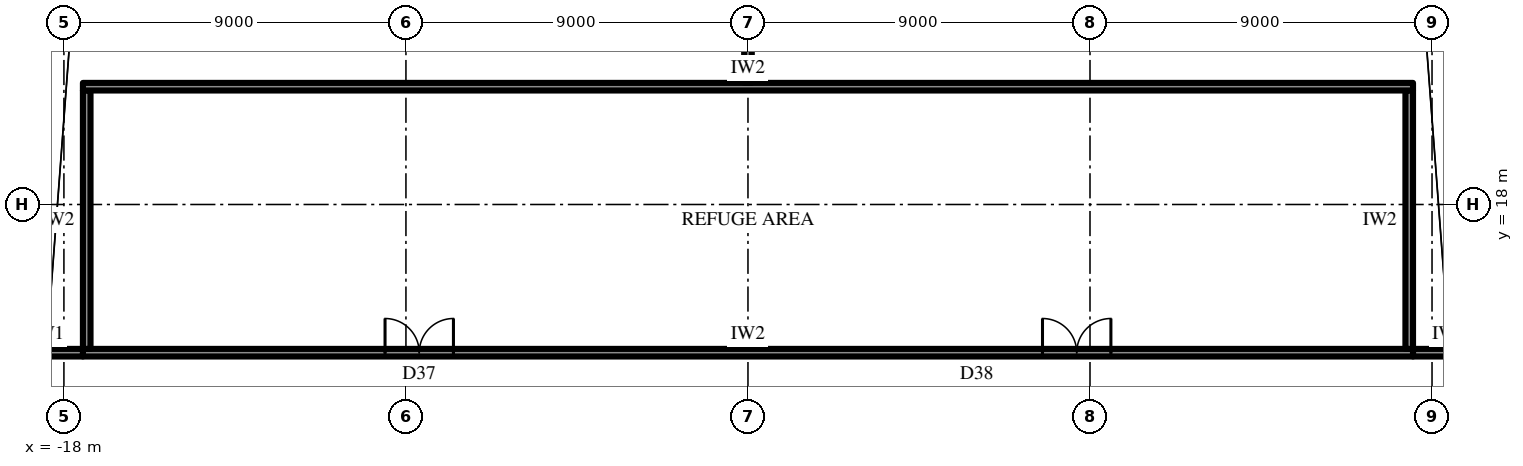
"""IFC4 building model, lengths in metres.
Left out: names, types, materials, properties, quantities, classifications, styles, units other than length and angle.
Written with IfcOpenShell. Run it as: python <this file> out.ifc"""

import sys

from ifc_helpers import new_model, si_unit, direction, frame, frame_2d, origin, place, context, subcontext, project, spatial, rectangle, extrude, element, fill, save


model = new_model("IFC4")
c1 = context("Model", 3, precision=1e-05, world=origin(), true_north=direction((0.0, 1.0)))
c2 = subcontext(c1, "Body", "Model", "MODEL_VIEW")
j1 = project(units=[si_unit("LENGTHUNIT", "METRE"), si_unit("PLANEANGLEUNIT", "RADIAN")], contexts=[c1])
p1 = place(None, origin())
s1 = spatial("IfcSite", under=j1, at=p1, CompositionType="ELEMENT")
p2 = place(p1, origin())
s2 = spatial("IfcBuilding", under=s1, at=p2, CompositionType="ELEMENT")
p3 = place(p2, frame((0.0, 0.0, 203.5)))
s3 = spatial("IfcBuildingStorey", under=s2, at=p3, CompositionType="ELEMENT", Elevation=203.5)
p4 = place(p3, frame((-17.5, 14.1, 0.0), z_axis=(0.0, 0.0, 1.0), x_axis=(1.0, 0.0, 0.0)))
e1 = element("IfcWall", 1, at=p4, inside=s3, PredefinedType="PARTITIONING", context=c2, shape_type="SweptSolid", body=[
    extrude(rectangle(XDim=35.0, YDim=0.2, at=frame_2d((17.5, 0.0))), origin(), (0.0, 0.0, 1.0), 6.7),
])
p5 = place(p4, frame((7.95, 0.0, 0.0)))
e2 = element("IfcOpeningElement", 2, at=p5, cuts=e1, PredefinedType="OPENING", context=c2, shape_type="SweptSolid", body=[
    extrude(rectangle(XDim=1.8, YDim=2.2, at=frame_2d((0.9, 1.1))), frame((0.0, 0.11, 0.0), z_axis=(0.0, -1.0, 0.0), x_axis=(1.0, 0.0, 0.0)), (0.0, 0.0, 1.0), 0.22),
])
p6 = place(p4, frame((25.25, 0.0, 0.0)))
e3 = element("IfcOpeningElement", 3, at=p6, cuts=e1, PredefinedType="OPENING", context=c2, shape_type="SweptSolid", body=[
    extrude(rectangle(XDim=1.8, YDim=2.2, at=frame_2d((0.9, 1.1))), frame((0.0, 0.11, 0.0), z_axis=(0.0, -1.0, 0.0), x_axis=(1.0, 0.0, 0.0)), (0.0, 0.0, 1.0), 0.22),
])
for number, where, z_axis, x_axis in (
    (4, (-17.4, 14.2, 0.0), (0.0, 0.0, 1.0), (0.0, 1.0, 0.0)),
    (5, (17.4, 14.2, 0.0), (0.0, 0.0, 1.0), (0.0, 1.0, 0.0)),
):
    element("IfcWall", number, at=place(p3, frame(where, z_axis=z_axis, x_axis=x_axis)), inside=s3, PredefinedType="PARTITIONING", context=c2, shape_type="SweptSolid", body=[
        extrude(rectangle(XDim=6.8, YDim=0.2, at=frame_2d((3.4, 0.0))), origin(), (0.0, 0.0, 1.0), 6.7),
    ])
p7 = place(p3, frame((-17.5, 21.1, 0.0), z_axis=(0.0, 0.0, 1.0), x_axis=(1.0, 0.0, 0.0)))
e6 = element("IfcWall", 6, at=p7, inside=s3, PredefinedType="PARTITIONING", context=c2, shape_type="SweptSolid", body=[
    extrude(rectangle(XDim=35.0, YDim=0.2, at=frame_2d((17.5, 0.0))), origin(), (0.0, 0.0, 1.0), 6.7),
])
for number, where, z_axis, x_axis in (
    (7, (-19.4, 14.1, 0.0), (0.0, 0.0, 1.0), (1.0, 0.0, 0.0)),
    (8, (17.5, 14.1, 0.0), (0.0, 0.0, 1.0), (1.0, 0.0, 0.0)),
):
    element("IfcWall", number, at=place(p3, frame(where, z_axis=z_axis, x_axis=x_axis)), inside=s3, PredefinedType="PARTITIONING", context=c2, shape_type="SweptSolid", body=[
        extrude(rectangle(XDim=1.9, YDim=0.2, at=frame_2d((0.95, 0.0))), origin(), (0.0, 0.0, 1.0), 6.7),
    ])
p8 = place(p3, frame((0.0, 21.2, 0.0), z_axis=(0.0, 0.0, 1.0), x_axis=(0.0, 1.0, 0.0)))
e9 = element("IfcWall", 9, at=p8, inside=s3, PredefinedType="PARTITIONING", context=c2, shape_type="SweptSolid", body=[
    extrude(rectangle(XDim=10.11, YDim=0.2, at=frame_2d((5.055, 0.0))), origin(), (0.0, 0.0, 1.0), 2.3),
])
p9 = place(p5, origin())
e10 = element("IfcDoor", 10, at=p9, inside=s3, OperationType="DOUBLE_DOOR_SINGLE_SWING", PredefinedType="DOOR", context=c2, shape_type="SweptSolid", body=[
    extrude(rectangle(XDim=1.8, YDim=2.2, at=frame_2d((0.9, 1.1))), frame((0.0, 0.025, 0.0), z_axis=(0.0, -1.0, 0.0), x_axis=(1.0, 0.0, 0.0)), (0.0, 0.0, 1.0), 0.05),
])
fill(e2, e10)
p10 = place(p6, origin())
e11 = element("IfcDoor", 11, at=p10, inside=s3, OperationType="DOUBLE_DOOR_SINGLE_SWING", PredefinedType="DOOR", context=c2, shape_type="SweptSolid", body=[
    extrude(rectangle(XDim=1.8, YDim=2.2, at=frame_2d((0.9, 1.1))), frame((0.0, 0.025, 0.0), z_axis=(0.0, -1.0, 0.0), x_axis=(1.0, 0.0, 0.0)), (0.0, 0.0, 1.0), 0.05),
])
fill(e3, e11)
save(model, sys.argv[1])
